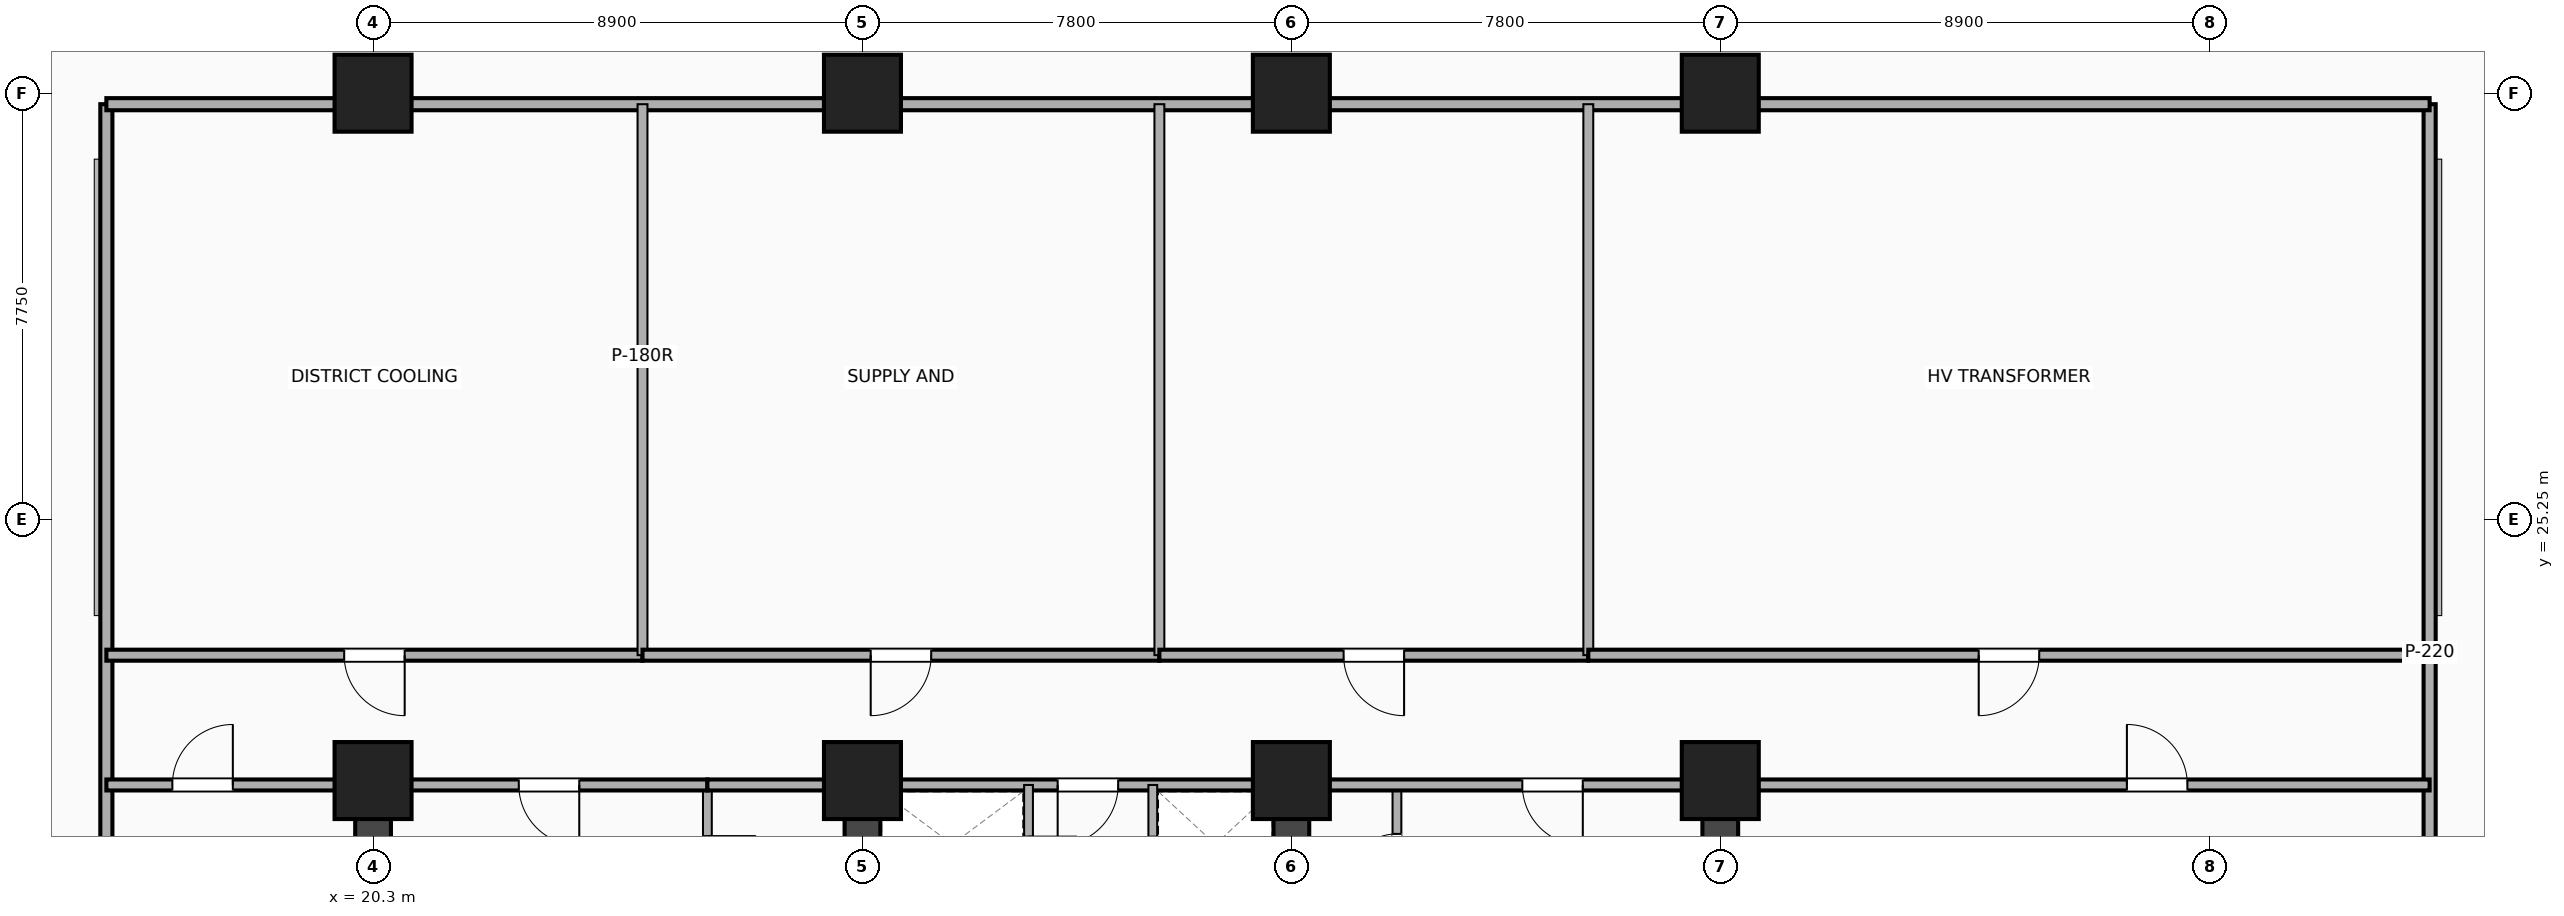
"""IFC4 building model, lengths in metres.
Left out: names, types, materials, properties, quantities, classifications, styles, units other than length and angle.
Written with IfcOpenShell. Run it as: python <this file> out.ifc"""

import sys

from ifc_helpers import new_model, si_unit, direction, frame, frame_2d, origin, origin_2d, place, context, subcontext, project, spatial, rectangle, extrude, element, fill, save


model = new_model("IFC4")
c1 = context("Model", 3, precision=1e-05, world=origin(), true_north=direction((0.0, 1.0)))
c2 = subcontext(c1, "Body", "Model", "MODEL_VIEW")
j1 = project(units=[si_unit("LENGTHUNIT", "METRE"), si_unit("PLANEANGLEUNIT", "RADIAN")], contexts=[c1])
p1 = place(None, origin())
s1 = spatial("IfcSite", under=j1, at=p1, CompositionType="ELEMENT")
p2 = place(p1, origin())
s2 = spatial("IfcBuilding", under=s1, at=p2, CompositionType="ELEMENT")
p3 = place(p2, frame((0.0, 0.0, 75.4)))
s3 = spatial("IfcBuildingStorey", under=s2, at=p3, CompositionType="ELEMENT", Elevation=75.4)
for number, where, z_axis, x_axis in (
    (1, (20.3, 3.5, 0.0), (0.0, 0.0, 1.0), (0.0, 1.0, 0.0)),
    (2, (44.8, 3.5, 0.0), (0.0, 0.0, 1.0), (0.0, 1.0, 0.0)),
):
    element("IfcWall", number, at=place(p3, frame(where, z_axis=z_axis, x_axis=x_axis)), inside=s3, PredefinedType="SHEAR", context=c2, shape_type="SweptSolid", body=[
        extrude(rectangle(XDim=16.9, YDim=0.65, at=frame_2d((8.45, 0.0))), origin(), (0.0, 0.0, 1.0), 8.14),
    ])
p4 = place(p3, frame((29.2, 3.5, 0.0), z_axis=(0.0, 0.0, 1.0), x_axis=(0.0, 1.0, 0.0)))
e3 = element("IfcWall", 3, at=p4, inside=s3, PredefinedType="SHEAR", context=c2, shape_type="SweptSolid", body=[
    extrude(rectangle(XDim=16.9, YDim=0.65, at=frame_2d((8.45, 0.0))), origin(), (0.0, 0.0, 1.0), 8.14),
])
p5 = place(p4, frame((7.75, 0.0, 0.0), z_axis=(0.0, 0.0, 1.0), x_axis=(-1.0, 0.0, 0.0)))
e4 = element("IfcOpeningElement", 4, at=p5, cuts=e3, PredefinedType="OPENING", context=c2, shape_type="SweptSolid", body=[
    extrude(rectangle(XDim=1.1, YDim=2.15, at=frame_2d((0.55, 1.075))), frame((0.0, 0.335, 0.0), z_axis=(0.0, -1.0, 0.0), x_axis=(1.0, 0.0, 0.0)), (0.0, 0.0, 1.0), 0.67),
])
p6 = place(p3, frame((37.0, 3.5, 0.0), z_axis=(0.0, 0.0, 1.0), x_axis=(0.0, 1.0, 0.0)))
e5 = element("IfcWall", 5, at=p6, inside=s3, PredefinedType="SHEAR", context=c2, shape_type="SweptSolid", body=[
    extrude(rectangle(XDim=16.9, YDim=0.65, at=frame_2d((8.45, 0.0))), origin(), (0.0, 0.0, 1.0), 8.14),
])
p7 = place(p6, frame((6.65, 0.0, 0.0)))
e6 = element("IfcOpeningElement", 6, at=p7, cuts=e5, PredefinedType="OPENING", context=c2, shape_type="SweptSolid", body=[
    extrude(rectangle(XDim=1.1, YDim=2.15, at=frame_2d((0.55, 1.075))), frame((0.0, 0.335, 0.0), z_axis=(0.0, -1.0, 0.0), x_axis=(1.0, 0.0, 0.0)), (0.0, 0.0, 1.0), 0.67),
])
for number, where, z_axis, x_axis in (
    (7, (20.3, 20.5, -0.32), (0.0, 0.0, 1.0), (1.0, 0.0, 0.0)),
    (8, (29.2, 20.5, -0.32), (0.0, 0.0, 1.0), (1.0, 0.0, 0.0)),
    (9, (37.0, 20.5, -0.32), (0.0, 0.0, 1.0), (1.0, 0.0, 0.0)),
    (10, (44.8, 20.5, -0.32), (0.0, 0.0, 1.0), (1.0, 0.0, 0.0)),
    (11, (20.3, 33.0, -0.32), (0.0, 0.0, 1.0), (1.0, 0.0, 0.0)),
    (12, (29.2, 33.0, -0.32), (0.0, 0.0, 1.0), (1.0, 0.0, 0.0)),
    (13, (37.0, 33.0, -0.32), (0.0, 0.0, 1.0), (1.0, 0.0, 0.0)),
    (14, (44.8, 33.0, -0.32), (0.0, 0.0, 1.0), (1.0, 0.0, 0.0)),
):
    element("IfcColumn", number, at=place(p3, frame(where, z_axis=z_axis, x_axis=x_axis)), inside=s3, PredefinedType="COLUMN", context=c2, shape_type="SweptSolid", body=[
        extrude(rectangle(XDim=1.4, YDim=1.4, at=origin_2d()), origin(), (0.0, 0.0, 1.0), 8.46),
    ])
p8 = place(p3, frame((26.38, 17.76, 0.0), z_axis=(0.0, 0.0, 1.0), x_axis=(0.0, 1.0, 0.0)))
e15 = element("IfcWall", 15, at=p8, inside=s3, PredefinedType="PARTITIONING", context=c2, shape_type="SweptSolid", body=[
    extrude(rectangle(XDim=2.66, YDim=0.16, at=frame_2d((1.33, 0.0))), origin(), (0.0, 0.0, 1.0), 7.43),
])
p9 = place(p8, frame((0.85, 0.0, 0.0)))
e16 = element("IfcOpeningElement", 16, at=p9, cuts=e15, PredefinedType="OPENING", context=c2, shape_type="SweptSolid", body=[
    extrude(rectangle(XDim=0.88, YDim=2.08, at=frame_2d((0.44, 1.04))), frame((0.0, 0.09, 0.0), z_axis=(0.0, -1.0, 0.0), x_axis=(1.0, 0.0, 0.0)), (0.0, 0.0, 1.0), 0.18),
])
p10 = place(p3, frame((38.92, 17.76, 0.0), z_axis=(0.0, 0.0, 1.0), x_axis=(0.0, 1.0, 0.0)))
e17 = element("IfcWall", 17, at=p10, inside=s3, PredefinedType="PARTITIONING", context=c2, shape_type="SweptSolid", body=[
    extrude(rectangle(XDim=2.66, YDim=0.16, at=frame_2d((1.33, 0.0))), origin(), (0.0, 0.0, 1.0), 7.43),
])
p11 = place(p10, frame((1.77, 0.0, 0.0), z_axis=(0.0, 0.0, 1.0), x_axis=(-1.0, 0.0, 0.0)))
e18 = element("IfcOpeningElement", 18, at=p11, cuts=e17, PredefinedType="OPENING", context=c2, shape_type="SweptSolid", body=[
    extrude(rectangle(XDim=0.92, YDim=2.08, at=frame_2d((0.46, 1.04))), frame((0.0, 0.09, 0.0), z_axis=(0.0, -1.0, 0.0), x_axis=(1.0, 0.0, 0.0)), (0.0, 0.0, 1.0), 0.18),
])
p12 = place(p3, frame((20.65, 20.42, 0.0), z_axis=(0.0, 0.0, 1.0), x_axis=(1.0, 0.0, 0.0)))
e19 = element("IfcWall", 19, at=p12, inside=s3, PredefinedType="PARTITIONING", context=c2, shape_type="SweptSolid", body=[
    extrude(rectangle(XDim=5.73, YDim=0.2, at=frame_2d((2.865, 0.0))), origin(), (0.0, 0.0, 1.0), 7.43),
])
p13 = place(p12, frame((2.3, 0.0, 0.0)))
e20 = element("IfcOpeningElement", 20, at=p13, cuts=e19, PredefinedType="OPENING", context=c2, shape_type="SweptSolid", body=[
    extrude(rectangle(XDim=1.1, YDim=2.15, at=frame_2d((0.55, 1.075))), frame((0.0, 0.11, 0.0), z_axis=(0.0, -1.0, 0.0), x_axis=(1.0, 0.0, 0.0)), (0.0, 0.0, 1.0), 0.22),
])
p14 = place(p3, frame((26.38, 20.42, 0.0), z_axis=(0.0, 0.0, 1.0), x_axis=(1.0, 0.0, 0.0)))
e21 = element("IfcWall", 21, at=p14, inside=s3, PredefinedType="PARTITIONING", context=c2, shape_type="SweptSolid", body=[
    extrude(rectangle(XDim=2.82, YDim=0.2, at=frame_2d((1.41, 0.0))), origin(), (0.0, 0.0, 1.0), 7.43),
])
p15 = place(p3, frame((29.2, 20.42, 0.0), z_axis=(0.0, 0.0, 1.0), x_axis=(1.0, 0.0, 0.0)))
e22 = element("IfcWall", 22, at=p15, inside=s3, PredefinedType="PARTITIONING", context=c2, shape_type="SweptSolid", body=[
    extrude(rectangle(XDim=7.8, YDim=0.2, at=frame_2d((3.9, 0.0))), origin(), (0.0, 0.0, 1.0), 7.43),
])
p16 = place(p15, frame((3.55, 0.0, 0.0)))
e23 = element("IfcOpeningElement", 23, at=p16, cuts=e22, PredefinedType="OPENING", context=c2, shape_type="SweptSolid", body=[
    extrude(rectangle(XDim=1.1, YDim=2.15, at=frame_2d((0.55, 1.075))), frame((0.0, 0.11, 0.0), z_axis=(0.0, -1.0, 0.0), x_axis=(1.0, 0.0, 0.0)), (0.0, 0.0, 1.0), 0.22),
])
p17 = place(p3, frame((37.0, 20.42, 0.0), z_axis=(0.0, 0.0, 1.0), x_axis=(1.0, 0.0, 0.0)))
e24 = element("IfcWall", 24, at=p17, inside=s3, PredefinedType="PARTITIONING", context=c2, shape_type="SweptSolid", body=[
    extrude(rectangle(XDim=7.45, YDim=0.2, at=frame_2d((3.725, 0.0))), origin(), (0.0, 0.0, 1.0), 6.445),
])
p18 = place(p17, frame((4.2, 0.0, 0.0)))
e25 = element("IfcOpeningElement", 25, at=p18, cuts=e24, PredefinedType="OPENING", context=c2, shape_type="SweptSolid", body=[
    extrude(rectangle(XDim=1.1, YDim=2.15, at=frame_2d((0.55, 1.075))), frame((0.0, 0.11, 0.0), z_axis=(0.0, -1.0, 0.0), x_axis=(1.0, 0.0, 0.0)), (0.0, 0.0, 1.0), 0.22),
])
p19 = place(p3, frame((32.22, 12.5, 0.0), z_axis=(0.0, 0.0, 1.0), x_axis=(0.0, 1.0, 0.0)))
e26 = element("IfcWall", 26, at=p19, inside=s3, PredefinedType="PARTITIONING", context=c2, shape_type="SweptSolid", body=[
    extrude(rectangle(XDim=7.92, YDim=0.16, at=frame_2d((3.96, 0.0))), origin(), (0.0, 0.0, 1.0), 7.43),
])
p20 = place(p19, frame((6.1, 0.0, 0.0)))
e27 = element("IfcOpeningElement", 27, at=p20, cuts=e26, PredefinedType="OPENING", context=c2, shape_type="SweptSolid", body=[
    extrude(rectangle(XDim=0.88, YDim=2.08, at=frame_2d((0.44, 1.04))), frame((0.0, 0.09, 0.0), z_axis=(0.0, -1.0, 0.0), x_axis=(1.0, 0.0, 0.0)), (0.0, 0.0, 1.0), 0.18),
])
p21 = place(p3, frame((34.48, 12.5, 0.0), z_axis=(0.0, 0.0, 1.0), x_axis=(0.0, 1.0, 0.0)))
e28 = element("IfcWall", 28, at=p21, inside=s3, PredefinedType="PARTITIONING", context=c2, shape_type="SweptSolid", body=[
    extrude(rectangle(XDim=7.92, YDim=0.16, at=frame_2d((3.96, 0.0))), origin(), (0.0, 0.0, 1.0), 7.43),
])
p22 = place(p21, frame((6.98, 0.0, 0.0), z_axis=(0.0, 0.0, 1.0), x_axis=(-1.0, 0.0, 0.0)))
e29 = element("IfcOpeningElement", 29, at=p22, cuts=e28, PredefinedType="OPENING", context=c2, shape_type="SweptSolid", body=[
    extrude(rectangle(XDim=0.88, YDim=2.08, at=frame_2d((0.44, 1.04))), frame((0.0, 0.09, 0.0), z_axis=(0.0, -1.0, 0.0), x_axis=(1.0, 0.0, 0.0)), (0.0, 0.0, 1.0), 0.18),
])
p23 = place(p3, frame((15.45, 12.0, 0.0), z_axis=(0.0, 0.0, 1.0), x_axis=(0.0, 1.0, 0.0)))
e30 = element("IfcWall", 30, at=p23, inside=s3, PredefinedType="PARTITIONING", context=c2, shape_type="SweptSolid", body=[
    extrude(rectangle(XDim=20.8, YDim=0.22, at=frame_2d((10.4, 0.0))), origin(), (0.0, 0.0, 1.0), 7.43),
])
p24 = place(p3, frame((57.7, 12.0, 0.0), z_axis=(0.0, 0.0, 1.0), x_axis=(0.0, 1.0, 0.0)))
e31 = element("IfcWall", 31, at=p24, inside=s3, PredefinedType="PARTITIONING", context=c2, shape_type="SweptSolid", body=[
    extrude(rectangle(XDim=20.8, YDim=0.22, at=frame_2d((10.4, 0.0))), origin(), (0.0, 0.0, 1.0), 6.445),
])
p25 = place(p3, frame((15.45, 32.8, 0.0), z_axis=(0.0, 0.0, 1.0), x_axis=(1.0, 0.0, 0.0)))
e32 = element("IfcWall", 32, at=p25, inside=s3, PredefinedType="PARTITIONING", context=c2, shape_type="SweptSolid", body=[
    extrude(rectangle(XDim=42.25, YDim=0.22, at=frame_2d((21.125, 0.0))), origin(), (0.0, 0.0, 1.0), 6.445),
])
p26 = place(p3, frame((15.45, 20.42, 0.0), z_axis=(0.0, 0.0, 1.0), x_axis=(1.0, 0.0, 0.0)))
e33 = element("IfcWall", 33, at=p26, inside=s3, PredefinedType="PARTITIONING", context=c2, shape_type="SweptSolid", body=[
    extrude(rectangle(XDim=4.85, YDim=0.2, at=frame_2d((2.425, 0.0))), origin(), (0.0, 0.0, 1.0), 7.43),
])
p27 = place(p26, frame((2.3, 0.0, 0.0), z_axis=(0.0, 0.0, 1.0), x_axis=(-1.0, 0.0, 0.0)))
e34 = element("IfcOpeningElement", 34, at=p27, cuts=e33, PredefinedType="OPENING", context=c2, shape_type="SweptSolid", body=[
    extrude(rectangle(XDim=1.1, YDim=2.15, at=frame_2d((0.55, 1.075))), frame((0.0, 0.11, 0.0), z_axis=(0.0, -1.0, 0.0), x_axis=(1.0, 0.0, 0.0)), (0.0, 0.0, 1.0), 0.22),
])
p28 = place(p3, frame((44.8, 20.42, 0.0), z_axis=(0.0, 0.0, 1.0), x_axis=(1.0, 0.0, 0.0)))
e35 = element("IfcWall", 35, at=p28, inside=s3, PredefinedType="PARTITIONING", context=c2, shape_type="SweptSolid", body=[
    extrude(rectangle(XDim=12.9, YDim=0.2, at=frame_2d((6.45, 0.0))), origin(), (0.0, 0.0, 1.0), 6.445),
])
p29 = place(p28, frame((8.495, 0.0, 0.0), z_axis=(0.0, 0.0, 1.0), x_axis=(-1.0, 0.0, 0.0)))
e36 = element("IfcOpeningElement", 36, at=p29, cuts=e35, PredefinedType="OPENING", context=c2, shape_type="SweptSolid", body=[
    extrude(rectangle(XDim=1.1, YDim=2.15, at=frame_2d((0.55, 1.075))), frame((0.0, 0.11, 0.0), z_axis=(0.0, -1.0, 0.0), x_axis=(1.0, 0.0, 0.0)), (0.0, 0.0, 1.0), 0.22),
])
p30 = place(p3, frame((15.45, 22.78, 0.0), z_axis=(0.0, 0.0, 1.0), x_axis=(1.0, 0.0, 0.0)))
e37 = element("IfcWall", 37, at=p30, inside=s3, PredefinedType="PARTITIONING", context=c2, shape_type="SweptSolid", body=[
    extrude(rectangle(XDim=9.75, YDim=0.2, at=frame_2d((4.875, 0.0))), origin(), (0.0, 0.0, 1.0), 7.43),
])
p31 = place(p30, frame((4.325, 0.0, 0.0)))
e38 = element("IfcOpeningElement", 38, at=p31, cuts=e37, PredefinedType="OPENING", context=c2, shape_type="SweptSolid", body=[
    extrude(rectangle(XDim=1.1, YDim=2.15, at=frame_2d((0.55, 1.075))), frame((0.0, 0.11, 0.0), z_axis=(0.0, -1.0, 0.0), x_axis=(1.0, 0.0, 0.0)), (0.0, 0.0, 1.0), 0.22),
])
p32 = place(p3, frame((25.2, 22.78, 0.0), z_axis=(0.0, 0.0, 1.0), x_axis=(0.0, 1.0, 0.0)))
e39 = element("IfcWall", 39, at=p32, inside=s3, PredefinedType="PARTITIONING", context=c2, shape_type="SweptSolid", body=[
    extrude(rectangle(XDim=10.02, YDim=0.18, at=frame_2d((5.01, 0.0))), origin(), (0.0, 0.0, 1.0), 7.43),
])
p33 = place(p3, frame((25.2, 22.78, 0.0), z_axis=(0.0, 0.0, 1.0), x_axis=(1.0, 0.0, 0.0)))
e40 = element("IfcWall", 40, at=p33, inside=s3, PredefinedType="PARTITIONING", context=c2, shape_type="SweptSolid", body=[
    extrude(rectangle(XDim=9.4, YDim=0.2, at=frame_2d((4.7, 0.0))), origin(), (0.0, 0.0, 1.0), 7.43),
])
p34 = place(p33, frame((4.15, 0.0, 0.0)))
e41 = element("IfcOpeningElement", 41, at=p34, cuts=e40, PredefinedType="OPENING", context=c2, shape_type="SweptSolid", body=[
    extrude(rectangle(XDim=1.1, YDim=2.15, at=frame_2d((0.55, 1.075))), frame((0.0, 0.11, 0.0), z_axis=(0.0, -1.0, 0.0), x_axis=(1.0, 0.0, 0.0)), (0.0, 0.0, 1.0), 0.22),
])
p35 = place(p3, frame((34.6, 22.78, 0.0), z_axis=(0.0, 0.0, 1.0), x_axis=(0.0, 1.0, 0.0)))
e42 = element("IfcWall", 42, at=p35, inside=s3, PredefinedType="PARTITIONING", context=c2, shape_type="SweptSolid", body=[
    extrude(rectangle(XDim=10.02, YDim=0.18, at=frame_2d((5.01, 0.0))), origin(), (0.0, 0.0, 1.0), 7.43),
])
p36 = place(p3, frame((34.6, 22.78, 0.0), z_axis=(0.0, 0.0, 1.0), x_axis=(1.0, 0.0, 0.0)))
e43 = element("IfcWall", 43, at=p36, inside=s3, PredefinedType="PARTITIONING", context=c2, shape_type="SweptSolid", body=[
    extrude(rectangle(XDim=7.8, YDim=0.2, at=frame_2d((3.9, 0.0))), origin(), (0.0, 0.0, 1.0), 7.43),
])
p37 = place(p36, frame((3.35, 0.0, 0.0)))
e44 = element("IfcOpeningElement", 44, at=p37, cuts=e43, PredefinedType="OPENING", context=c2, shape_type="SweptSolid", body=[
    extrude(rectangle(XDim=1.1, YDim=2.15, at=frame_2d((0.55, 1.075))), frame((0.0, 0.11, 0.0), z_axis=(0.0, -1.0, 0.0), x_axis=(1.0, 0.0, 0.0)), (0.0, 0.0, 1.0), 0.22),
])
p38 = place(p3, frame((42.4, 22.78, 0.0), z_axis=(0.0, 0.0, 1.0), x_axis=(0.0, 1.0, 0.0)))
e45 = element("IfcWall", 45, at=p38, inside=s3, PredefinedType="PARTITIONING", context=c2, shape_type="SweptSolid", body=[
    extrude(rectangle(XDim=10.02, YDim=0.18, at=frame_2d((5.01, 0.0))), origin(), (0.0, 0.0, 1.0), 7.43),
])
p39 = place(p3, frame((42.4, 22.78, 0.0), z_axis=(0.0, 0.0, 1.0), x_axis=(1.0, 0.0, 0.0)))
e46 = element("IfcWall", 46, at=p39, inside=s3, PredefinedType="PARTITIONING", context=c2, shape_type="SweptSolid", body=[
    extrude(rectangle(XDim=15.3, YDim=0.2, at=frame_2d((7.65, 0.0))), origin(), (0.0, 0.0, 1.0), 7.43),
])
p40 = place(p39, frame((7.1, 0.0, 0.0)))
e47 = element("IfcOpeningElement", 47, at=p40, cuts=e46, PredefinedType="OPENING", context=c2, shape_type="SweptSolid", body=[
    extrude(rectangle(XDim=1.1, YDim=2.15, at=frame_2d((0.55, 1.075))), frame((0.0, 0.11, 0.0), z_axis=(0.0, -1.0, 0.0), x_axis=(1.0, 0.0, 0.0)), (0.0, 0.0, 1.0), 0.22),
])
p41 = place(p11, origin())
e48 = element("IfcDoor", 48, at=p41, inside=s3, OperationType="SINGLE_SWING_LEFT", PredefinedType="DOOR", context=c2, shape_type="SweptSolid", body=[
    extrude(rectangle(XDim=0.92, YDim=2.08, at=frame_2d((0.46, 1.04))), frame((0.0, 0.025, 0.0), z_axis=(0.0, -1.0, 0.0), x_axis=(1.0, 0.0, 0.0)), (0.0, 0.0, 1.0), 0.05),
])
fill(e18, e48)
p42 = place(p13, origin())
e49 = element("IfcDoor", 49, at=p42, inside=s3, OperationType="SINGLE_SWING_RIGHT", PredefinedType="DOOR", context=c2, shape_type="SweptSolid", body=[
    extrude(rectangle(XDim=1.1, YDim=2.15, at=frame_2d((0.55, 1.075))), frame((0.0, 0.025, 0.0), z_axis=(0.0, -1.0, 0.0), x_axis=(1.0, 0.0, 0.0)), (0.0, 0.0, 1.0), 0.05),
])
fill(e20, e49)
p43 = place(p16, origin())
e50 = element("IfcDoor", 50, at=p43, inside=s3, OperationType="SINGLE_SWING_LEFT", PredefinedType="DOOR", context=c2, shape_type="SweptSolid", body=[
    extrude(rectangle(XDim=1.1, YDim=2.15, at=frame_2d((0.55, 1.075))), frame((0.0, 0.025, 0.0), z_axis=(0.0, -1.0, 0.0), x_axis=(1.0, 0.0, 0.0)), (0.0, 0.0, 1.0), 0.05),
])
fill(e23, e50)
p44 = place(p18, origin())
e51 = element("IfcDoor", 51, at=p44, inside=s3, OperationType="SINGLE_SWING_RIGHT", PredefinedType="DOOR", context=c2, shape_type="SweptSolid", body=[
    extrude(rectangle(XDim=1.1, YDim=2.15, at=frame_2d((0.55, 1.075))), frame((0.0, 0.025, 0.0), z_axis=(0.0, -1.0, 0.0), x_axis=(1.0, 0.0, 0.0)), (0.0, 0.0, 1.0), 0.05),
])
fill(e25, e51)
p45 = place(p27, origin())
e52 = element("IfcDoor", 52, at=p45, inside=s3, OperationType="SINGLE_SWING_RIGHT", PredefinedType="DOOR", context=c2, shape_type="SweptSolid", body=[
    extrude(rectangle(XDim=1.1, YDim=2.15, at=frame_2d((0.55, 1.075))), frame((0.0, 0.025, 0.0), z_axis=(0.0, -1.0, 0.0), x_axis=(1.0, 0.0, 0.0)), (0.0, 0.0, 1.0), 0.05),
])
fill(e34, e52)
p46 = place(p29, origin())
e53 = element("IfcDoor", 53, at=p46, inside=s3, OperationType="SINGLE_SWING_LEFT", PredefinedType="DOOR", context=c2, shape_type="SweptSolid", body=[
    extrude(rectangle(XDim=1.1, YDim=2.15, at=frame_2d((0.55, 1.075))), frame((0.0, 0.025, 0.0), z_axis=(0.0, -1.0, 0.0), x_axis=(1.0, 0.0, 0.0)), (0.0, 0.0, 1.0), 0.05),
])
fill(e36, e53)
p47 = place(p31, origin())
e54 = element("IfcDoor", 54, at=p47, inside=s3, OperationType="SINGLE_SWING_RIGHT", PredefinedType="DOOR", context=c2, shape_type="SweptSolid", body=[
    extrude(rectangle(XDim=1.1, YDim=2.15, at=frame_2d((0.55, 1.075))), frame((0.0, 0.025, 0.0), z_axis=(0.0, -1.0, 0.0), x_axis=(1.0, 0.0, 0.0)), (0.0, 0.0, 1.0), 0.05),
])
fill(e38, e54)
p48 = place(p34, origin())
e55 = element("IfcDoor", 55, at=p48, inside=s3, OperationType="SINGLE_SWING_LEFT", PredefinedType="DOOR", context=c2, shape_type="SweptSolid", body=[
    extrude(rectangle(XDim=1.1, YDim=2.15, at=frame_2d((0.55, 1.075))), frame((0.0, 0.025, 0.0), z_axis=(0.0, -1.0, 0.0), x_axis=(1.0, 0.0, 0.0)), (0.0, 0.0, 1.0), 0.05),
])
fill(e41, e55)
p49 = place(p37, origin())
e56 = element("IfcDoor", 56, at=p49, inside=s3, OperationType="SINGLE_SWING_RIGHT", PredefinedType="DOOR", context=c2, shape_type="SweptSolid", body=[
    extrude(rectangle(XDim=1.1, YDim=2.15, at=frame_2d((0.55, 1.075))), frame((0.0, 0.025, 0.0), z_axis=(0.0, -1.0, 0.0), x_axis=(1.0, 0.0, 0.0)), (0.0, 0.0, 1.0), 0.05),
])
fill(e44, e56)
p50 = place(p40, origin())
e57 = element("IfcDoor", 57, at=p50, inside=s3, OperationType="SINGLE_SWING_LEFT", PredefinedType="DOOR", context=c2, shape_type="SweptSolid", body=[
    extrude(rectangle(XDim=1.1, YDim=2.15, at=frame_2d((0.55, 1.075))), frame((0.0, 0.025, 0.0), z_axis=(0.0, -1.0, 0.0), x_axis=(1.0, 0.0, 0.0)), (0.0, 0.0, 1.0), 0.05),
])
fill(e47, e57)
save(model, sys.argv[1])
